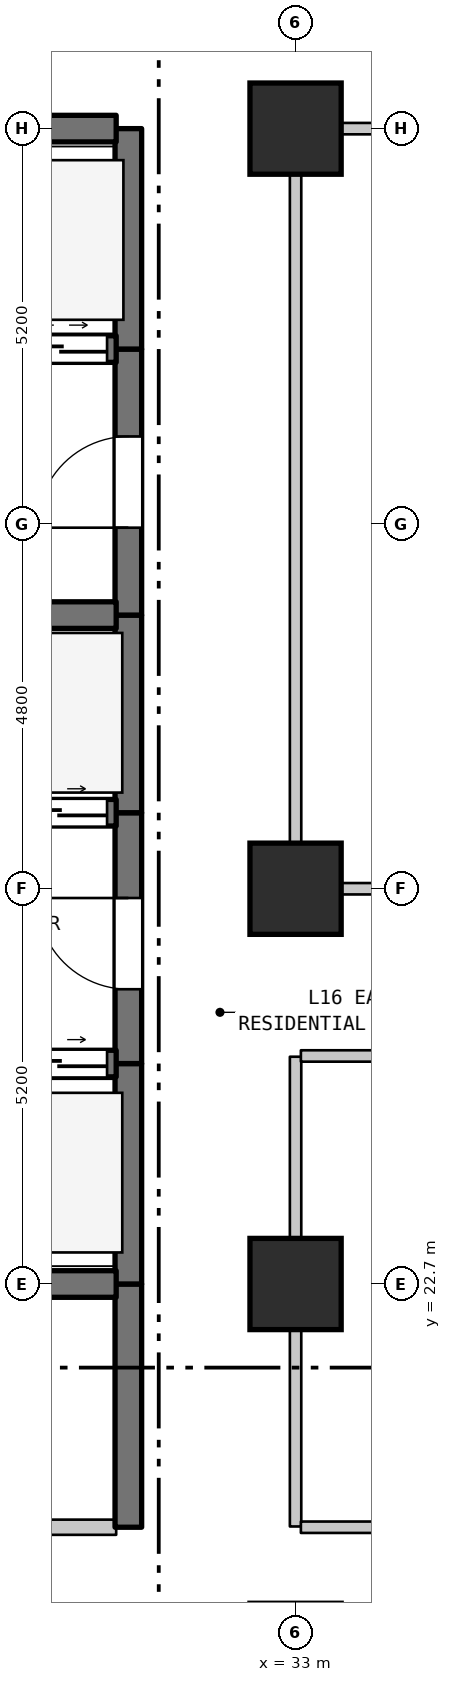
"""IFC4 building model, lengths in metres.
Left out: names, types, materials, properties, quantities, classifications, styles, units other than length and angle.
Written with IfcOpenShell. Run it as: python <this file> out.ifc"""

import sys

from ifc_helpers import new_model, si_unit, direction, frame, frame_2d, origin, origin_2d, place, context, subcontext, project, spatial, rectangle, extrude, element, fill, save


model = new_model("IFC4")
c1 = context("Model", 3, precision=1e-05, world=origin(), true_north=direction((0.0, 1.0)))
c2 = subcontext(c1, "Body", "Model", "MODEL_VIEW")
j1 = project(units=[si_unit("LENGTHUNIT", "METRE"), si_unit("PLANEANGLEUNIT", "RADIAN")], contexts=[c1])
p1 = place(None, origin())
s1 = spatial("IfcSite", under=j1, at=p1, CompositionType="ELEMENT")
p2 = place(p1, origin())
s2 = spatial("IfcBuilding", under=s1, at=p2, CompositionType="ELEMENT")
p3 = place(p2, frame((0.0, 0.0, 70.1)))
s3 = spatial("IfcBuildingStorey", under=s2, at=p3, CompositionType="ELEMENT", Elevation=70.1)
for number, where, z_axis, x_axis in (
    (1, (33.0, 22.7, 0.0), (0.0, 0.0, 1.0), (1.0, 0.0, 0.0)),
    (2, (33.0, 27.9, 0.0), (0.0, 0.0, 1.0), (1.0, 0.0, 0.0)),
    (3, (33.0, 37.9, 0.0), (0.0, 0.0, 1.0), (1.0, 0.0, 0.0)),
):
    element("IfcColumn", number, at=place(p3, frame(where, z_axis=z_axis, x_axis=x_axis)), inside=s3, PredefinedType="COLUMN", context=c2, shape_type="SweptSolid", body=[
        extrude(rectangle(XDim=1.2, YDim=1.2, at=origin_2d()), origin(), (0.0, 0.0, 1.0), 3.7),
    ])
p4 = place(p3, frame((30.8, 19.5, 0.0), z_axis=(0.0, 0.0, 1.0), x_axis=(0.0, 1.0, 0.0)))
e4 = element("IfcWall", 4, at=p4, inside=s3, PredefinedType="SHEAR", context=c2, shape_type="SweptSolid", body=[
    extrude(rectangle(XDim=3.2, YDim=0.35, at=frame_2d((1.6, 0.0))), origin(), (0.0, 0.0, 1.0), 3.385),
])
p5 = place(p3, frame((30.8, 22.7, 0.0), z_axis=(0.0, 0.0, 1.0), x_axis=(0.0, 1.0, 0.0)))
e5 = element("IfcWall", 5, at=p5, inside=s3, PredefinedType="SHEAR", context=c2, shape_type="SweptSolid", body=[
    extrude(rectangle(XDim=2.9, YDim=0.35, at=frame_2d((1.45, 0.0))), origin(), (0.0, 0.0, 1.0), 3.385),
])
p6 = place(p3, frame((30.8, 25.6, 0.0), z_axis=(0.0, 0.0, 1.0), x_axis=(0.0, 1.0, 0.0)))
e6 = element("IfcWall", 6, at=p6, inside=s3, PredefinedType="SHEAR", context=c2, shape_type="SweptSolid", body=[
    extrude(rectangle(XDim=3.3, YDim=0.35, at=frame_2d((1.65, 0.0))), origin(), (0.0, 0.0, 1.0), 3.385),
])
p7 = place(p6, frame((0.978, 0.0, 0.0)))
e7 = element("IfcOpeningElement", 7, at=p7, cuts=e6, PredefinedType="OPENING", context=c2, shape_type="SweptSolid", body=[
    extrude(rectangle(XDim=1.2, YDim=2.2, at=frame_2d((0.6, 1.1))), frame((0.0, 0.185, 0.0), z_axis=(0.0, -1.0, 0.0), x_axis=(1.0, 0.0, 0.0)), (0.0, 0.0, 1.0), 0.37),
])
p8 = place(p3, frame((30.8, 28.9, 0.0), z_axis=(0.0, 0.0, 1.0), x_axis=(0.0, 1.0, 0.0)))
e8 = element("IfcWall", 8, at=p8, inside=s3, PredefinedType="SHEAR", context=c2, shape_type="SweptSolid", body=[
    extrude(rectangle(XDim=2.6, YDim=0.35, at=frame_2d((1.3, 0.0))), origin(), (0.0, 0.0, 1.0), 3.385),
])
p9 = place(p3, frame((30.8, 31.5, 0.0), z_axis=(0.0, 0.0, 1.0), x_axis=(0.0, 1.0, 0.0)))
e9 = element("IfcWall", 9, at=p9, inside=s3, PredefinedType="SHEAR", context=c2, shape_type="SweptSolid", body=[
    extrude(rectangle(XDim=3.5, YDim=0.35, at=frame_2d((1.75, 0.0))), origin(), (0.0, 0.0, 1.0), 3.385),
])
p10 = place(p9, frame((1.15, 0.0, 0.0)))
e10 = element("IfcOpeningElement", 10, at=p10, cuts=e9, PredefinedType="OPENING", context=c2, shape_type="SweptSolid", body=[
    extrude(rectangle(XDim=1.2, YDim=2.2, at=frame_2d((0.6, 1.1))), frame((0.0, 0.185, 0.0), z_axis=(0.0, -1.0, 0.0), x_axis=(1.0, 0.0, 0.0)), (0.0, 0.0, 1.0), 0.37),
])
p11 = place(p3, frame((30.8, 35.0, 0.0), z_axis=(0.0, 0.0, 1.0), x_axis=(0.0, 1.0, 0.0)))
e11 = element("IfcWall", 11, at=p11, inside=s3, PredefinedType="SHEAR", context=c2, shape_type="SweptSolid", body=[
    extrude(rectangle(XDim=2.9, YDim=0.35, at=frame_2d((1.45, 0.0))), origin(), (0.0, 0.0, 1.0), 3.385),
])
p12 = place(p3, frame((33.0, 19.51, 0.0), z_axis=(0.0, 0.0, 1.0), x_axis=(0.0, 1.0, 0.0)))
e12 = element("IfcWall", 12, at=p12, inside=s3, PredefinedType="STANDARD", context=c2, shape_type="SweptSolid", body=[
    extrude(rectangle(XDim=6.18, YDim=0.15, at=frame_2d((3.09, 0.0))), origin(), (0.0, 0.0, 1.0), 2.885),
])
p13 = place(p3, frame((33.0, 27.91, 0.0), z_axis=(0.0, 0.0, 1.0), x_axis=(0.0, 1.0, 0.0)))
e13 = element("IfcWall", 13, at=p13, inside=s3, PredefinedType="STANDARD", context=c2, shape_type="SweptSolid", body=[
    extrude(rectangle(XDim=9.98, YDim=0.15, at=frame_2d((4.99, 0.0))), origin(), (0.0, 0.0, 1.0), 2.885),
])
p14 = place(p3, frame((25.985, 19.5, 0.0), z_axis=(0.0, 0.0, 1.0), x_axis=(1.0, 0.0, 0.0)))
e14 = element("IfcWall", 14, at=p14, inside=s3, PredefinedType="STANDARD", context=c2, shape_type="SweptSolid", body=[
    extrude(rectangle(XDim=4.655, YDim=0.2, at=frame_2d((2.327, 0.0))), origin(), (0.0, 0.0, 1.0), 3.385),
])
p15 = place(p14, frame((1.845, 0.0, 0.0)))
e15 = element("IfcOpeningElement", 15, at=p15, cuts=e14, PredefinedType="OPENING", context=c2, shape_type="SweptSolid", body=[
    extrude(rectangle(XDim=0.9, YDim=2.15, at=frame_2d((0.45, 1.075))), frame((0.0, 0.11, 0.0), z_axis=(0.0, -1.0, 0.0), x_axis=(1.0, 0.0, 0.0)), (0.0, 0.0, 1.0), 0.22),
])
p16 = place(p3, frame((33.07, 19.5, 0.0), z_axis=(0.0, 0.0, 1.0), x_axis=(1.0, 0.0, 0.0)))
e16 = element("IfcWall", 16, at=p16, inside=s3, PredefinedType="STANDARD", context=c2, shape_type="SweptSolid", body=[
    extrude(rectangle(XDim=33.27, YDim=0.15, at=frame_2d((16.635, 0.0))), origin(), (0.0, 0.0, 1.0), 3.385),
])
p17 = place(p16, frame((16.065, 0.0, 0.0)))
e17 = element("IfcOpeningElement", 17, at=p17, cuts=e16, PredefinedType="OPENING", context=c2, shape_type="SweptSolid", body=[
    extrude(rectangle(XDim=1.0, YDim=2.15, at=frame_2d((0.5, 1.075))), frame((0.0, 0.085, 0.0), z_axis=(0.0, -1.0, 0.0), x_axis=(1.0, 0.0, 0.0)), (0.0, 0.0, 1.0), 0.17),
])
p18 = place(p3, frame((27.46, 22.7, 0.0), z_axis=(0.0, 0.0, 1.0), x_axis=(1.0, 0.0, 0.0)))
e18 = element("IfcWall", 18, at=p18, inside=s3, PredefinedType="SHEAR", context=c2, shape_type="SweptSolid", body=[
    extrude(rectangle(XDim=3.18, YDim=0.35, at=frame_2d((1.59, 0.0))), origin(), (0.0, 0.0, 1.0), 3.385),
])
p19 = place(p3, frame((27.46, 25.6, 0.0), z_axis=(0.0, 0.0, 1.0), x_axis=(1.0, 0.0, 0.0)))
e19 = element("IfcWall", 19, at=p19, inside=s3, PredefinedType="SHEAR", context=c2, shape_type="SweptSolid", body=[
    extrude(rectangle(XDim=3.18, YDim=0.35, at=frame_2d((1.59, 0.0))), origin(), (0.0, 0.0, 1.0), 3.385),
])
p20 = place(p19, frame((0.12, 0.0, 0.0)))
e20 = element("IfcOpeningElement", 20, at=p20, cuts=e19, PredefinedType="OPENING", context=c2, shape_type="SweptSolid", body=[
    extrude(rectangle(XDim=1.25, YDim=2.2, at=frame_2d((0.625, 1.1))), frame((0.0, 0.185, 0.0), z_axis=(0.0, -1.0, 0.0), x_axis=(1.0, 0.0, 0.0)), (0.0, 0.0, 1.0), 0.37),
])
p21 = place(p19, frame((1.81, 0.0, 0.0)))
e21 = element("IfcOpeningElement", 21, at=p21, cuts=e19, PredefinedType="OPENING", context=c2, shape_type="SweptSolid", body=[
    extrude(rectangle(XDim=1.25, YDim=2.2, at=frame_2d((0.625, 1.1))), frame((0.0, 0.185, 0.0), z_axis=(0.0, -1.0, 0.0), x_axis=(1.0, 0.0, 0.0)), (0.0, 0.0, 1.0), 0.37),
])
p22 = place(p3, frame((33.07, 25.7, 0.0), z_axis=(0.0, 0.0, 1.0), x_axis=(1.0, 0.0, 0.0)))
e22 = element("IfcWall", 22, at=p22, inside=s3, PredefinedType="STANDARD", context=c2, shape_type="SweptSolid", body=[
    extrude(rectangle(XDim=30.87, YDim=0.15, at=frame_2d((15.435, 0.0))), origin(), (0.0, 0.0, 1.0), 3.385),
])
p23 = place(p3, frame((33.07, 27.9, 0.0), z_axis=(0.0, 0.0, 1.0), x_axis=(1.0, 0.0, 0.0)))
e23 = element("IfcWall", 23, at=p23, inside=s3, PredefinedType="STANDARD", context=c2, shape_type="SweptSolid", body=[
    extrude(rectangle(XDim=30.87, YDim=0.15, at=frame_2d((15.435, 0.0))), origin(), (0.0, 0.0, 1.0), 2.885),
])
p24 = place(p23, frame((14.935, 0.0, 0.0)))
e24 = element("IfcOpeningElement", 24, at=p24, cuts=e23, PredefinedType="OPENING", context=c2, shape_type="SweptSolid", body=[
    extrude(rectangle(XDim=1.0, YDim=2.15, at=frame_2d((0.5, 1.075))), frame((0.0, 0.085, 0.0), z_axis=(0.0, -1.0, 0.0), x_axis=(1.0, 0.0, 0.0)), (0.0, 0.0, 1.0), 0.17),
])
p25 = place(p3, frame((27.46, 28.9, 0.0), z_axis=(0.0, 0.0, 1.0), x_axis=(1.0, 0.0, 0.0)))
e25 = element("IfcWall", 25, at=p25, inside=s3, PredefinedType="SHEAR", context=c2, shape_type="SweptSolid", body=[
    extrude(rectangle(XDim=3.18, YDim=0.35, at=frame_2d((1.59, 0.0))), origin(), (0.0, 0.0, 1.0), 3.385),
])
p26 = place(p25, frame((0.12, 0.0, 0.0)))
e26 = element("IfcOpeningElement", 26, at=p26, cuts=e25, PredefinedType="OPENING", context=c2, shape_type="SweptSolid", body=[
    extrude(rectangle(XDim=1.25, YDim=2.2, at=frame_2d((0.625, 1.1))), frame((0.0, 0.185, 0.0), z_axis=(0.0, -1.0, 0.0), x_axis=(1.0, 0.0, 0.0)), (0.0, 0.0, 1.0), 0.37),
])
p27 = place(p25, frame((1.81, 0.0, 0.0)))
e27 = element("IfcOpeningElement", 27, at=p27, cuts=e25, PredefinedType="OPENING", context=c2, shape_type="SweptSolid", body=[
    extrude(rectangle(XDim=1.25, YDim=2.2, at=frame_2d((0.625, 1.1))), frame((0.0, 0.185, 0.0), z_axis=(0.0, -1.0, 0.0), x_axis=(1.0, 0.0, 0.0)), (0.0, 0.0, 1.0), 0.37),
])
p28 = place(p3, frame((27.46, 31.5, 0.0), z_axis=(0.0, 0.0, 1.0), x_axis=(1.0, 0.0, 0.0)))
e28 = element("IfcWall", 28, at=p28, inside=s3, PredefinedType="SHEAR", context=c2, shape_type="SweptSolid", body=[
    extrude(rectangle(XDim=3.18, YDim=0.35, at=frame_2d((1.59, 0.0))), origin(), (0.0, 0.0, 1.0), 3.385),
])
p29 = place(p3, frame((19.16, 35.0, 0.0), z_axis=(0.0, 0.0, 1.0), x_axis=(1.0, 0.0, 0.0)))
e29 = element("IfcWall", 29, at=p29, inside=s3, PredefinedType="SHEAR", context=c2, shape_type="SweptSolid", body=[
    extrude(rectangle(XDim=11.48, YDim=0.35, at=frame_2d((5.74, 0.0))), origin(), (0.0, 0.0, 1.0), 3.385),
])
p30 = place(p29, frame((0.365, 0.0, 0.0)))
e30 = element("IfcOpeningElement", 30, at=p30, cuts=e29, PredefinedType="OPENING", context=c2, shape_type="SweptSolid", body=[
    extrude(rectangle(XDim=1.35, YDim=2.2, at=frame_2d((0.675, 1.1))), frame((0.0, 0.185, 0.0), z_axis=(0.0, -1.0, 0.0), x_axis=(1.0, 0.0, 0.0)), (0.0, 0.0, 1.0), 0.37),
])
p31 = place(p29, frame((2.765, 0.0, 0.0)))
e31 = element("IfcOpeningElement", 31, at=p31, cuts=e29, PredefinedType="OPENING", context=c2, shape_type="SweptSolid", body=[
    extrude(rectangle(XDim=1.35, YDim=2.2, at=frame_2d((0.675, 1.1))), frame((0.0, 0.185, 0.0), z_axis=(0.0, -1.0, 0.0), x_axis=(1.0, 0.0, 0.0)), (0.0, 0.0, 1.0), 0.37),
])
p32 = place(p29, frame((4.915, 0.0, 0.0)))
e32 = element("IfcOpeningElement", 32, at=p32, cuts=e29, PredefinedType="OPENING", context=c2, shape_type="SweptSolid", body=[
    extrude(rectangle(XDim=1.2, YDim=2.2, at=frame_2d((0.6, 1.1))), frame((0.0, 0.185, 0.0), z_axis=(0.0, -1.0, 0.0), x_axis=(1.0, 0.0, 0.0)), (0.0, 0.0, 1.0), 0.37),
])
p33 = place(p29, frame((6.665, 0.0, 0.0)))
e33 = element("IfcOpeningElement", 33, at=p33, cuts=e29, PredefinedType="OPENING", context=c2, shape_type="SweptSolid", body=[
    extrude(rectangle(XDim=1.2, YDim=2.2, at=frame_2d((0.6, 1.1))), frame((0.0, 0.185, 0.0), z_axis=(0.0, -1.0, 0.0), x_axis=(1.0, 0.0, 0.0)), (0.0, 0.0, 1.0), 0.37),
])
p34 = place(p29, frame((8.415, 0.0, 0.0)))
e34 = element("IfcOpeningElement", 34, at=p34, cuts=e29, PredefinedType="OPENING", context=c2, shape_type="SweptSolid", body=[
    extrude(rectangle(XDim=1.2, YDim=2.2, at=frame_2d((0.6, 1.1))), frame((0.0, 0.185, 0.0), z_axis=(0.0, -1.0, 0.0), x_axis=(1.0, 0.0, 0.0)), (0.0, 0.0, 1.0), 0.37),
])
p35 = place(p29, frame((10.16, 0.0, 0.0)))
e35 = element("IfcOpeningElement", 35, at=p35, cuts=e29, PredefinedType="OPENING", context=c2, shape_type="SweptSolid", body=[
    extrude(rectangle(XDim=1.2, YDim=2.2, at=frame_2d((0.6, 1.1))), frame((0.0, 0.185, 0.0), z_axis=(0.0, -1.0, 0.0), x_axis=(1.0, 0.0, 0.0)), (0.0, 0.0, 1.0), 0.37),
])
p36 = place(p3, frame((19.16, 37.9, 0.0), z_axis=(0.0, 0.0, 1.0), x_axis=(1.0, 0.0, 0.0)))
e36 = element("IfcWall", 36, at=p36, inside=s3, PredefinedType="SHEAR", context=c2, shape_type="SweptSolid", body=[
    extrude(rectangle(XDim=11.48, YDim=0.35, at=frame_2d((5.74, 0.0))), origin(), (0.0, 0.0, 1.0), 3.385),
])
p37 = place(p3, frame((33.07, 37.9, 0.0), z_axis=(0.0, 0.0, 1.0), x_axis=(1.0, 0.0, 0.0)))
e37 = element("IfcWall", 37, at=p37, inside=s3, PredefinedType="STANDARD", context=c2, shape_type="SweptSolid", body=[
    extrude(rectangle(XDim=26.935, YDim=0.15, at=frame_2d((13.467, 0.0))), origin(), (0.0, 0.0, 1.0), 3.385),
])
p38 = place(p7, origin())
e38 = element("IfcDoor", 38, at=p38, inside=s3, OperationType="SINGLE_SWING_RIGHT", PredefinedType="DOOR", context=c2, shape_type="SweptSolid", body=[
    extrude(rectangle(XDim=1.2, YDim=2.2, at=frame_2d((0.6, 1.1))), frame((0.0, 0.025, 0.0), z_axis=(0.0, -1.0, 0.0), x_axis=(1.0, 0.0, 0.0)), (0.0, 0.0, 1.0), 0.05),
])
fill(e7, e38)
p39 = place(p10, origin())
e39 = element("IfcDoor", 39, at=p39, inside=s3, OperationType="SINGLE_SWING_LEFT", PredefinedType="DOOR", context=c2, shape_type="SweptSolid", body=[
    extrude(rectangle(XDim=1.2, YDim=2.2, at=frame_2d((0.6, 1.1))), frame((0.0, 0.025, 0.0), z_axis=(0.0, -1.0, 0.0), x_axis=(1.0, 0.0, 0.0)), (0.0, 0.0, 1.0), 0.05),
])
fill(e10, e39)
p40 = place(p21, origin())
e40 = element("IfcDoor", 40, at=p40, inside=s3, OperationType="DOUBLE_DOOR_SLIDING", PredefinedType="DOOR", context=c2, shape_type="SweptSolid", body=[
    extrude(rectangle(XDim=1.25, YDim=2.2, at=frame_2d((0.625, 1.1))), frame((0.0, 0.025, 0.0), z_axis=(0.0, -1.0, 0.0), x_axis=(1.0, 0.0, 0.0)), (0.0, 0.0, 1.0), 0.05),
])
fill(e21, e40)
p41 = place(p27, origin())
e41 = element("IfcDoor", 41, at=p41, inside=s3, OperationType="DOUBLE_DOOR_SLIDING", PredefinedType="DOOR", context=c2, shape_type="SweptSolid", body=[
    extrude(rectangle(XDim=1.25, YDim=2.2, at=frame_2d((0.625, 1.1))), frame((0.0, 0.025, 0.0), z_axis=(0.0, -1.0, 0.0), x_axis=(1.0, 0.0, 0.0)), (0.0, 0.0, 1.0), 0.05),
])
fill(e27, e41)
p42 = place(p35, origin())
e42 = element("IfcDoor", 42, at=p42, inside=s3, OperationType="DOUBLE_DOOR_SLIDING", PredefinedType="DOOR", context=c2, shape_type="SweptSolid", body=[
    extrude(rectangle(XDim=1.2, YDim=2.2, at=frame_2d((0.6, 1.1))), frame((0.0, 0.025, 0.0), z_axis=(0.0, -1.0, 0.0), x_axis=(1.0, 0.0, 0.0)), (0.0, 0.0, 1.0), 0.05),
])
fill(e35, e42)
save(model, sys.argv[1])
